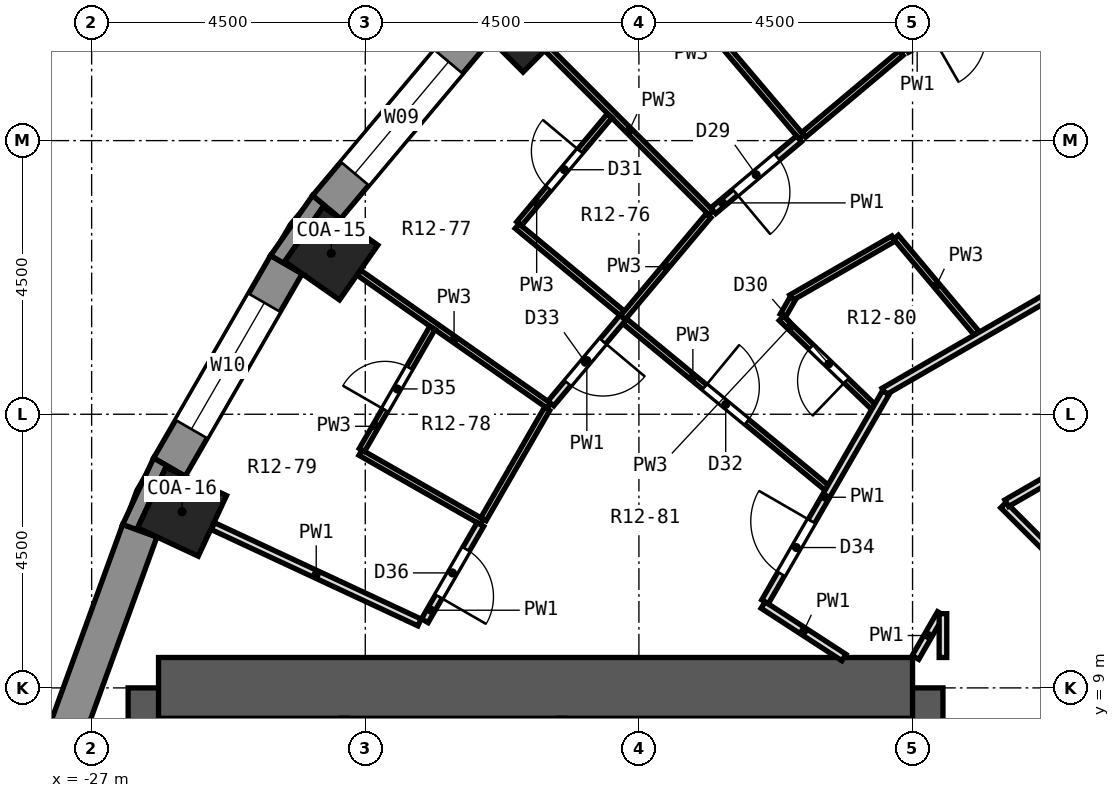
"""IFC4 building model, lengths in metres.
Left out: names, types, materials, properties, quantities, classifications, styles, units other than length and angle.
Written with IfcOpenShell. Run it as: python <this file> out.ifc"""

import sys

from ifc_helpers import new_model, si_unit, direction, frame, frame_2d, origin, origin_2d, place, context, subcontext, project, spatial, polyline, rectangle, outline, extrude, element, fill, save


model = new_model("IFC4")
c1 = context("Model", 3, precision=1e-05, world=origin(), true_north=direction((0.0, 1.0)))
c2 = subcontext(c1, "Body", "Model", "MODEL_VIEW")
j1 = project(units=[si_unit("LENGTHUNIT", "METRE"), si_unit("PLANEANGLEUNIT", "RADIAN")], contexts=[c1])
p1 = place(None, origin())
s1 = spatial("IfcSite", under=j1, at=p1, CompositionType="ELEMENT")
p2 = place(p1, origin())
s2 = spatial("IfcBuilding", under=s1, at=p2, CompositionType="ELEMENT")
p3 = place(p2, frame((0.0, 0.0, 56.0)))
s3 = spatial("IfcBuildingStorey", under=s2, at=p3, CompositionType="ELEMENT", Elevation=56.0)
for number, where, z_axis, x_axis in (
    (1, (-19.905, 19.905, 0.0), (0.0, 0.0, 1.0), (-0.707, 0.707, 0.0)),
    (2, (-23.059, 16.146, 0.0), (0.0, 0.0, 1.0), (-0.819, 0.574, 0.0)),
    (3, (-25.512, 11.897, 0.0), (0.0, 0.0, 1.0), (-0.906, 0.423, 0.0)),
):
    element("IfcColumn", number, at=place(p3, frame(where, z_axis=z_axis, x_axis=x_axis)), inside=s3, PredefinedType="COLUMN", context=c2, shape_type="SweptSolid", body=[
        extrude(rectangle(XDim=1.1, YDim=1.1, at=origin_2d()), origin(), (0.0, 0.0, 1.0), 3.3),
    ])
p4 = place(p3, frame((-13.5, -9.0, 0.0), z_axis=(0.0, 0.0, 1.0), x_axis=(0.0, 1.0, 0.0)))
e4 = element("IfcWall", 4, at=p4, inside=s3, PredefinedType="SHEAR", context=c2, shape_type="SweptSolid", body=[
    extrude(rectangle(XDim=18.0, YDim=1.0, at=frame_2d((9.0, 0.0))), origin(), (0.0, 0.0, 1.0), 3.3),
])
p5 = place(p4, frame((15.4, 0.0, 0.0)))
e5 = element("IfcOpeningElement", 5, at=p5, cuts=e4, PredefinedType="OPENING", context=c2, shape_type="SweptSolid", body=[
    extrude(rectangle(XDim=1.2, YDim=2.1, at=frame_2d((0.6, 1.05))), frame((0.0, 0.512, 0.0), z_axis=(0.0, -1.0, 0.0), x_axis=(1.0, 0.0, 0.0)), (0.0, 0.0, 1.0), 1.024),
])
p6 = place(p4, frame((1.4, 0.0, 0.0)))
e6 = element("IfcOpeningElement", 6, at=p6, cuts=e4, PredefinedType="OPENING", context=c2, shape_type="SweptSolid", body=[
    extrude(rectangle(XDim=1.2, YDim=2.1, at=frame_2d((0.6, 1.05))), frame((0.0, 0.512, 0.0), z_axis=(0.0, -1.0, 0.0), x_axis=(1.0, 0.0, 0.0)), (0.0, 0.0, 1.0), 1.024),
])
p7 = place(p4, frame((7.5, 0.0, 0.0)))
e7 = element("IfcOpeningElement", 7, at=p7, cuts=e4, PredefinedType="OPENING", context=c2, shape_type="SweptSolid", body=[
    extrude(rectangle(XDim=3.0, YDim=2.4, at=frame_2d((1.5, 1.2))), frame((0.0, 0.512, 0.0), z_axis=(0.0, -1.0, 0.0), x_axis=(1.0, 0.0, 0.0)), (0.0, 0.0, 1.0), 1.024),
])
p8 = place(p3, frame((-25.9, -9.0, 0.0), z_axis=(0.0, 0.0, 1.0), x_axis=(0.0, 1.0, 0.0)))
e8 = element("IfcWall", 8, at=p8, inside=s3, PredefinedType="SHEAR", context=c2, shape_type="SweptSolid", body=[
    extrude(rectangle(XDim=18.0, YDim=1.0, at=frame_2d((9.0, 0.0))), origin(), (0.0, 0.0, 1.0), 3.3),
])
p9 = place(p3, frame((-13.5, 9.0, 0.0), z_axis=(0.0, 0.0, 1.0), x_axis=(-1.0, 0.0, 0.0)))
e9 = element("IfcWall", 9, at=p9, inside=s3, PredefinedType="SHEAR", context=c2, shape_type="SweptSolid", body=[
    extrude(rectangle(XDim=12.4, YDim=1.0, at=frame_2d((6.2, 0.0))), origin(), (0.0, 0.0, 1.0), 3.3),
])
p10 = place(p3, frame((-20.665, 19.85, 0.0), z_axis=(0.0, 0.0, 1.0), x_axis=(-0.642809392687, -0.766026164483, 0.0)))
e10 = element("IfcWall", 10, at=p10, inside=s3, PredefinedType="SOLIDWALL", context=c2, shape_type="SweptSolid", body=[
    extrude(rectangle(XDim=3.846, YDim=0.6, at=frame_2d((1.923, 0.0))), origin(), (0.0, 0.0, 1.0), 2.75),
])
p11 = place(p10, frame((0.723, 0.0, 0.9)))
e11 = element("IfcOpeningElement", 11, at=p11, cuts=e10, PredefinedType="OPENING", context=c2, shape_type="SweptSolid", body=[
    extrude(rectangle(XDim=2.4, YDim=1.8, at=frame_2d((1.2, 0.9))), frame((0.0, 0.312, 0.0), z_axis=(0.0, -1.0, 0.0), x_axis=(1.0, 0.0, 0.0)), (0.0, 0.0, 1.0), 0.624),
])
p12 = place(p3, frame((-23.798, 15.96, 0.0), z_axis=(0.0, 0.0, 1.0), x_axis=(-0.499989888488, -0.86603124159, 0.0)))
e12 = element("IfcWall", 12, at=p12, inside=s3, PredefinedType="SOLIDWALL", context=c2, shape_type="SweptSolid", body=[
    extrude(rectangle(XDim=3.846, YDim=0.6, at=frame_2d((1.923, 0.0))), origin(), (0.0, 0.0, 1.0), 2.75),
])
p13 = place(p12, frame((0.723, 0.0, 0.9)))
e13 = element("IfcOpeningElement", 13, at=p13, cuts=e12, PredefinedType="OPENING", context=c2, shape_type="SweptSolid", body=[
    extrude(rectangle(XDim=2.4, YDim=1.8, at=frame_2d((1.2, 0.9))), frame((0.0, 0.312, 0.0), z_axis=(0.0, -1.0, 0.0), x_axis=(1.0, 0.0, 0.0)), (0.0, 0.0, 1.0), 0.624),
])
p14 = place(p3, frame((-26.208, 11.585, 0.0), z_axis=(0.0, 0.0, 1.0), x_axis=(-0.342028474173, -0.939689588564, 0.0)))
e14 = element("IfcWall", 14, at=p14, inside=s3, PredefinedType="SOLIDWALL", context=c2, shape_type="SweptSolid", body=[
    extrude(rectangle(XDim=3.846, YDim=0.6, at=frame_2d((1.923, 0.0))), origin(), (0.0, 0.0, 1.0), 2.75),
])
p15 = place(p3, origin())
e15 = element("IfcWall", 15, at=p15, inside=s3, PredefinedType="SOLIDWALL", context=c2, shape_type="SweptSolid", body=[
    extrude(outline(polyline([(-23.367, 17.097), (-24.058, 16.11), (-23.538, 15.81), (-23.825, 16.011), (-23.194, 16.912), (-22.907, 16.711), (-23.367, 17.097)])), origin(), (0.0, 0.0, 1.0), 2.75),
])
p16 = place(p3, origin())
e16 = element("IfcWall", 16, at=p16, inside=s3, PredefinedType="SOLIDWALL", context=c2, shape_type="SweptSolid", body=[
    extrude(outline(polyline([(-26.49, 11.688), (-25.926, 11.483), (-26.243, 11.631), (-25.779, 12.628), (-25.461, 12.479), (-25.981, 12.78), (-26.49, 11.688)])), origin(), (0.0, 0.0, 1.0), 2.75),
])
p17 = place(p3, frame((-13.772, 16.413, 0.0), z_axis=(0.0, 0.0, 1.0), x_axis=(0.642721705291, -0.766099738643, 0.0)))
e17 = element("IfcWall", 17, at=p17, inside=s3, PredefinedType="PARTITIONING", context=c2, shape_type="SweptSolid", body=[
    extrude(rectangle(XDim=2.07, YDim=0.1, at=frame_2d((1.035, 0.0))), origin(), (0.0, 0.0, 1.0), 2.75),
])
p18 = place(p3, frame((-16.817, 19.816, 0.0), z_axis=(0.0, 0.0, 1.0), x_axis=(0.646883930741, -0.762588473653, 0.0)))
e18 = element("IfcWall", 18, at=p18, inside=s3, PredefinedType="PARTITIONING", context=c2, shape_type="SweptSolid", body=[
    extrude(rectangle(XDim=2.3, YDim=0.1, at=frame_2d((1.15, 0.0))), origin(), (0.0, 0.0, 1.0), 2.75),
])
p19 = place(p3, frame((-19.509, 19.509, 0.0), z_axis=(0.0, 0.0, 1.0), x_axis=(0.707106781187, -0.707106781187, 0.0)))
e19 = element("IfcWall", 19, at=p19, inside=s3, PredefinedType="PARTITIONING", context=c2, shape_type="SweptSolid", body=[
    extrude(rectangle(XDim=3.81, YDim=0.1, at=frame_2d((1.905, 0.0))), origin(), (0.0, 0.0, 1.0), 2.75),
])
p20 = place(p3, frame((-12.006, 12.006, 0.0), z_axis=(0.0, 0.0, 1.0), x_axis=(0.707106781187, -0.707106781187, 0.0)))
e20 = element("IfcWall", 20, at=p20, inside=s3, PredefinedType="PARTITIONING", context=c2, shape_type="SweptSolid", body=[
    extrude(rectangle(XDim=7.387, YDim=0.125, at=frame_2d((3.693, 0.0))), origin(), (0.0, 0.0, 1.0), 2.75),
])
p21 = place(p3, frame((-15.658, 15.078, 0.0), z_axis=(0.0, 0.0, 1.0), x_axis=(0.720406258369, -0.693552321676, 0.0)))
e21 = element("IfcWall", 21, at=p21, inside=s3, PredefinedType="PARTITIONING", context=c2, shape_type="SweptSolid", body=[
    extrude(rectangle(XDim=2.1, YDim=0.1, at=frame_2d((1.05, 0.0))), origin(), (0.0, 0.0, 1.0), 2.75),
])
p22 = place(p21, frame((0.681, 0.0, 0.0)))
e22 = element("IfcOpeningElement", 22, at=p22, cuts=e21, PredefinedType="OPENING", context=c2, shape_type="SweptSolid", body=[
    extrude(rectangle(XDim=0.8, YDim=2.1, at=frame_2d((0.4, 1.05))), frame((0.0, 0.062, 0.0), z_axis=(0.0, -1.0, 0.0), x_axis=(1.0, 0.0, 0.0)), (0.0, 0.0, 1.0), 0.124),
])
p23 = place(p3, frame((-20.003, 16.594, 0.0), z_axis=(0.0, 0.0, 1.0), x_axis=(0.769713734446, -0.638389197125, 0.0)))
e23 = element("IfcWall", 23, at=p23, inside=s3, PredefinedType="PARTITIONING", context=c2, shape_type="SweptSolid", body=[
    extrude(rectangle(XDim=2.25, YDim=0.1, at=frame_2d((1.125, 0.0))), origin(), (0.0, 0.0, 1.0), 2.75),
])
p24 = place(p3, frame((-18.232, 15.029, 0.0), z_axis=(0.0, 0.0, 1.0), x_axis=(0.771607312324, -0.636099171174, 0.0)))
e24 = element("IfcWall", 24, at=p24, inside=s3, PredefinedType="PARTITIONING", context=c2, shape_type="SweptSolid", body=[
    extrude(rectangle(XDim=4.301, YDim=0.1, at=frame_2d((2.15, 0.0))), origin(), (0.0, 0.0, 1.0), 2.75),
])
p25 = place(p24, frame((1.7, 0.0, 0.0)))
e25 = element("IfcOpeningElement", 25, at=p25, cuts=e24, PredefinedType="OPENING", context=c2, shape_type="SweptSolid", body=[
    extrude(rectangle(XDim=0.9, YDim=2.1, at=frame_2d((0.45, 1.05))), frame((0.0, 0.062, 0.0), z_axis=(0.0, -1.0, 0.0), x_axis=(1.0, 0.0, 0.0)), (0.0, 0.0, 1.0), 0.124),
])
p26 = place(p3, frame((-22.601, 15.825, 0.0), z_axis=(0.0, 0.0, 1.0), x_axis=(0.819153632733, -0.573574167811, 0.0)))
e26 = element("IfcWall", 26, at=p26, inside=s3, PredefinedType="PARTITIONING", context=c2, shape_type="SweptSolid", body=[
    extrude(rectangle(XDim=3.81, YDim=0.1, at=frame_2d((1.905, 0.0))), origin(), (0.0, 0.0, 1.0), 2.75),
])
p27 = place(p3, frame((-15.957, 10.362, 0.0), z_axis=(0.0, 0.0, 1.0), x_axis=(0.838795721465, -0.544446267002, 0.0)))
e27 = element("IfcWall", 27, at=p27, inside=s3, PredefinedType="PARTITIONING", context=c2, shape_type="SweptSolid", body=[
    extrude(rectangle(XDim=1.583, YDim=0.125, at=frame_2d((0.792, 0.0))), origin(), (0.0, 0.0, 1.0), 2.75),
])
p28 = place(p3, frame((-22.58, 12.869, 0.0), z_axis=(0.0, 0.0, 1.0), x_axis=(0.868771789729, -0.495212658735, 0.0)))
e28 = element("IfcWall", 28, at=p28, inside=s3, PredefinedType="PARTITIONING", context=c2, shape_type="SweptSolid", body=[
    extrude(rectangle(XDim=2.3, YDim=0.1, at=frame_2d((1.15, 0.0))), origin(), (0.0, 0.0, 1.0), 2.75),
])
p29 = place(p3, frame((-25.005, 11.66, 0.0), z_axis=(0.0, 0.0, 1.0), x_axis=(0.906339528383, -0.42255018553, 0.0)))
e29 = element("IfcWall", 29, at=p29, inside=s3, PredefinedType="PARTITIONING", context=c2, shape_type="SweptSolid", body=[
    extrude(rectangle(XDim=3.748, YDim=0.125, at=frame_2d((1.874, 0.0))), origin(), (0.0, 0.0, 1.0), 2.75),
])
p30 = place(p3, frame((-11.952, 12.037, 0.0), z_axis=(0.0, 0.0, 1.0), x_axis=(0.866072505035, 0.499918409365, 0.0)))
e30 = element("IfcWall", 30, at=p30, inside=s3, PredefinedType="PARTITIONING", context=c2, shape_type="SweptSolid", body=[
    extrude(rectangle(XDim=8.664, YDim=0.125, at=frame_2d((4.332, 0.0))), origin(), (0.0, 0.0, 1.0), 2.75),
])
p31 = place(p30, frame((3.882, 0.0, 0.0)))
e31 = element("IfcOpeningElement", 31, at=p31, cuts=e30, PredefinedType="OPENING", context=c2, shape_type="SweptSolid", body=[
    extrude(rectangle(XDim=0.9, YDim=2.1, at=frame_2d((0.45, 1.05))), frame((0.0, 0.074, 0.0), z_axis=(0.0, -1.0, 0.0), x_axis=(1.0, 0.0, 0.0)), (0.0, 0.0, 1.0), 0.149),
])
p32 = place(p3, frame((-13.971, 13.873, 0.0), z_axis=(0.0, 0.0, 1.0), x_axis=(0.866024825845, 0.50000100102, 0.0)))
e32 = element("IfcWall", 32, at=p32, inside=s3, PredefinedType="PARTITIONING", context=c2, shape_type="SweptSolid", body=[
    extrude(rectangle(XDim=10.192, YDim=0.125, at=frame_2d((5.096, 0.0))), origin(), (0.0, 0.0, 1.0), 2.75),
])
p33 = place(p3, frame((-15.496, 15.417, 0.0), z_axis=(0.0, 0.0, 1.0), x_axis=(0.865919547832, 0.500183303083, 0.0)))
e33 = element("IfcWall", 33, at=p33, inside=s3, PredefinedType="PARTITIONING", context=c2, shape_type="SweptSolid", body=[
    extrude(rectangle(XDim=1.941, YDim=0.1, at=frame_2d((0.971, 0.0))), origin(), (0.0, 0.0, 1.0), 2.75),
])
p34 = place(p3, frame((-15.291, 18.094, 0.0), z_axis=(0.0, 0.0, 1.0), x_axis=(0.765911671875, 0.642945807114, 0.0)))
e34 = element("IfcWall", 34, at=p34, inside=s3, PredefinedType="PARTITIONING", context=c2, shape_type="SweptSolid", body=[
    extrude(rectangle(XDim=2.093, YDim=0.1, at=frame_2d((1.046, 0.0))), origin(), (0.0, 0.0, 1.0), 2.75),
])
p35 = place(p3, frame((-16.777, 16.847, 0.0), z_axis=(0.0, 0.0, 1.0), x_axis=(0.766052425686, 0.642778096314, 0.0)))
e35 = element("IfcWall", 35, at=p35, inside=s3, PredefinedType="PARTITIONING", context=c2, shape_type="SweptSolid", body=[
    extrude(rectangle(XDim=1.84, YDim=0.125, at=frame_2d((0.92, 0.0))), origin(), (0.0, 0.0, 1.0), 2.75),
])
p36 = place(p35, frame((0.47, 0.0, 0.0)))
e36 = element("IfcOpeningElement", 36, at=p36, cuts=e35, PredefinedType="OPENING", context=c2, shape_type="SweptSolid", body=[
    extrude(rectangle(XDim=0.9, YDim=2.1, at=frame_2d((0.45, 1.05))), frame((0.0, 0.074, 0.0), z_axis=(0.0, -1.0, 0.0), x_axis=(1.0, 0.0, 0.0)), (0.0, 0.0, 1.0), 0.149),
])
p37 = place(p3, frame((-18.265, 15.087, 0.0), z_axis=(0.0, 0.0, 1.0), x_axis=(0.643038029584, 0.765834246106, 0.0)))
e37 = element("IfcWall", 37, at=p37, inside=s3, PredefinedType="PARTITIONING", context=c2, shape_type="SweptSolid", body=[
    extrude(rectangle(XDim=2.193, YDim=0.1, at=frame_2d((1.096, 0.0))), origin(), (0.0, 0.0, 1.0), 2.75),
])
p38 = place(p3, frame((-19.448, 13.678, 0.0), z_axis=(0.0, 0.0, 1.0), x_axis=(0.642778096314, 0.766052425686, 0.0)))
e38 = element("IfcWall", 38, at=p38, inside=s3, PredefinedType="PARTITIONING", context=c2, shape_type="SweptSolid", body=[
    extrude(rectangle(XDim=1.84, YDim=0.125, at=frame_2d((0.92, 0.0))), origin(), (0.0, 0.0, 1.0), 2.75),
])
p39 = place(p38, frame((0.433, 0.0, 0.0)))
e39 = element("IfcOpeningElement", 39, at=p39, cuts=e38, PredefinedType="OPENING", context=c2, shape_type="SweptSolid", body=[
    extrude(rectangle(XDim=0.9, YDim=2.1, at=frame_2d((0.45, 1.05))), frame((0.0, 0.074, 0.0), z_axis=(0.0, -1.0, 0.0), x_axis=(1.0, 0.0, 0.0)), (0.0, 0.0, 1.0), 0.149),
])
p40 = place(p3, frame((-19.971, 16.632, 0.0), z_axis=(0.0, 0.0, 1.0), x_axis=(0.642624220064, 0.766181513603, 0.0)))
e40 = element("IfcWall", 40, at=p40, inside=s3, PredefinedType="PARTITIONING", context=c2, shape_type="SweptSolid", body=[
    extrude(rectangle(XDim=2.32, YDim=0.1, at=frame_2d((1.16, 0.0))), origin(), (0.0, 0.0, 1.0), 2.75),
])
p41 = place(p40, frame((0.76, 0.0, 0.0)))
e41 = element("IfcOpeningElement", 41, at=p41, cuts=e40, PredefinedType="OPENING", context=c2, shape_type="SweptSolid", body=[
    extrude(rectangle(XDim=0.8, YDim=2.1, at=frame_2d((0.4, 1.05))), frame((0.0, 0.062, 0.0), z_axis=(0.0, -1.0, 0.0), x_axis=(1.0, 0.0, 0.0)), (0.0, 0.0, 1.0), 0.124),
])
p42 = place(p3, frame((-13.452, 9.5, 0.0), z_axis=(0.0, 0.0, 1.0), x_axis=(0.49991670217, 0.866073490468, 0.0)))
e42 = element("IfcWall", 42, at=p42, inside=s3, PredefinedType="PARTITIONING", context=c2, shape_type="SweptSolid", body=[
    extrude(rectangle(XDim=0.834, YDim=0.125, at=frame_2d((0.417, 0.0))), origin(), (0.0, 0.0, 1.0), 2.75),
])
p43 = place(p3, frame((-15.926, 10.416, 0.0), z_axis=(0.0, 0.0, 1.0), x_axis=(0.500020477838, 0.866013580576, 0.0)))
e43 = element("IfcWall", 43, at=p43, inside=s3, PredefinedType="PARTITIONING", context=c2, shape_type="SweptSolid", body=[
    extrude(rectangle(XDim=3.971, YDim=0.125, at=frame_2d((1.985, 0.0))), origin(), (0.0, 0.0, 1.0), 2.75),
])
p44 = place(p43, frame((0.53, 0.0, 0.0)))
e44 = element("IfcOpeningElement", 44, at=p44, cuts=e43, PredefinedType="OPENING", context=c2, shape_type="SweptSolid", body=[
    extrude(rectangle(XDim=1.0, YDim=2.1, at=frame_2d((0.5, 1.05))), frame((0.0, 0.074, 0.0), z_axis=(0.0, -1.0, 0.0), x_axis=(1.0, 0.0, 0.0)), (0.0, 0.0, 1.0), 0.149),
])
p45 = place(p3, frame((-20.557, 11.773, 0.0), z_axis=(0.0, 0.0, 1.0), x_axis=(0.499752749986, 0.866168106594, 0.0)))
e45 = element("IfcWall", 45, at=p45, inside=s3, PredefinedType="PARTITIONING", context=c2, shape_type="SweptSolid", body=[
    extrude(rectangle(XDim=2.093, YDim=0.1, at=frame_2d((1.046, 0.0))), origin(), (0.0, 0.0, 1.0), 2.75),
])
p46 = place(p3, frame((-21.521, 10.104, 0.0), z_axis=(0.0, 0.0, 1.0), x_axis=(0.500003827654, 0.866023193876, 0.0)))
e46 = element("IfcWall", 46, at=p46, inside=s3, PredefinedType="PARTITIONING", context=c2, shape_type="SweptSolid", body=[
    extrude(rectangle(XDim=1.828, YDim=0.125, at=frame_2d((0.914, 0.0))), origin(), (0.0, 0.0, 1.0), 2.75),
])
p47 = place(p46, frame((0.458, 0.0, 0.0)))
e47 = element("IfcOpeningElement", 47, at=p47, cuts=e46, PredefinedType="OPENING", context=c2, shape_type="SweptSolid", body=[
    extrude(rectangle(XDim=0.9, YDim=2.1, at=frame_2d((0.45, 1.05))), frame((0.0, 0.074, 0.0), z_axis=(0.0, -1.0, 0.0), x_axis=(1.0, 0.0, 0.0)), (0.0, 0.0, 1.0), 0.149),
])
p48 = place(p3, frame((-22.555, 12.912, 0.0), z_axis=(0.0, 0.0, 1.0), x_axis=(0.499819678633, 0.866129487347, 0.0)))
e48 = element("IfcWall", 48, at=p48, inside=s3, PredefinedType="PARTITIONING", context=c2, shape_type="SweptSolid", body=[
    extrude(rectangle(XDim=2.319, YDim=0.1, at=frame_2d((1.159, 0.0))), origin(), (0.0, 0.0, 1.0), 2.75),
])
p49 = place(p48, frame((0.76, 0.0, 0.0)))
e49 = element("IfcOpeningElement", 49, at=p49, cuts=e48, PredefinedType="OPENING", context=c2, shape_type="SweptSolid", body=[
    extrude(rectangle(XDim=0.8, YDim=2.1, at=frame_2d((0.4, 1.05))), frame((0.0, 0.062, 0.0), z_axis=(0.0, -1.0, 0.0), x_axis=(1.0, 0.0, 0.0)), (0.0, 0.0, 1.0), 0.124),
])
p50 = place(p3, frame((-15.633, 15.121, 0.0), z_axis=(0.0, 0.0, 1.0), x_axis=(0.499375175205, 0.866385846139, 0.0)))
e50 = element("IfcWall", 50, at=p50, inside=s3, PredefinedType="PARTITIONING", context=c2, shape_type="SweptSolid", body=[
    extrude(rectangle(XDim=0.325, YDim=0.1, at=frame_2d((0.162, 0.0))), origin(), (0.0, 0.0, 1.0), 2.75),
])
p51 = place(p3, frame((-13.0, 9.5, 0.0), z_axis=(0.0, 0.0, 1.0), x_axis=(0.0, 1.0, 0.0)))
e51 = element("IfcWall", 51, at=p51, inside=s3, PredefinedType="PARTITIONING", context=c2, shape_type="SweptSolid", body=[
    extrude(rectangle(XDim=0.72, YDim=0.125, at=frame_2d((0.36, 0.0))), origin(), (0.0, 0.0, 1.0), 2.75),
])
for number, where, z_axis, x_axis in (
    (52, (-19.27, 5.3, 0.0), (0.0, 0.0, 1.0), (0.0, 1.0, 0.0)),
    (53, (-22.846, 5.3, 0.0), (0.0, 0.0, 1.0), (0.0, 1.0, 0.0)),
):
    element("IfcWall", number, at=place(p3, frame(where, z_axis=z_axis, x_axis=x_axis)), inside=s3, PredefinedType="PARTITIONING", context=c2, shape_type="SweptSolid", body=[
        extrude(rectangle(XDim=3.2, YDim=0.1, at=frame_2d((1.6, 0.0))), origin(), (0.0, 0.0, 1.0), 2.75),
    ])
p52 = place(p11, origin())
e54 = element("IfcWindow", 54, at=p52, inside=s3, PartitioningType="SINGLE_PANEL", PredefinedType="WINDOW", context=c2, shape_type="SweptSolid", body=[
    extrude(rectangle(XDim=2.4, YDim=1.8, at=frame_2d((1.2, 0.9))), frame((0.0, 0.18, 0.0), z_axis=(0.0, -1.0, 0.0), x_axis=(1.0, 0.0, 0.0)), (0.0, 0.0, 1.0), 0.06),
])
fill(e11, e54)
p53 = place(p13, origin())
e55 = element("IfcWindow", 55, at=p53, inside=s3, PartitioningType="SINGLE_PANEL", PredefinedType="WINDOW", context=c2, shape_type="SweptSolid", body=[
    extrude(rectangle(XDim=2.4, YDim=1.8, at=frame_2d((1.2, 0.9))), frame((0.0, 0.18, 0.0), z_axis=(0.0, -1.0, 0.0), x_axis=(1.0, 0.0, 0.0)), (0.0, 0.0, 1.0), 0.06),
])
fill(e13, e55)
p54 = place(p36, frame((0.9, 0.0, 0.0), z_axis=(0.0, 0.0, 1.0), x_axis=(-1.0, 0.0, 0.0)))
e56 = element("IfcDoor", 56, at=p54, inside=s3, OperationType="SINGLE_SWING_RIGHT", PredefinedType="DOOR", context=c2, shape_type="SweptSolid", body=[
    extrude(rectangle(XDim=0.9, YDim=2.1, at=frame_2d((0.45, 1.05))), frame((0.0, 0.025, 0.0), z_axis=(0.0, -1.0, 0.0), x_axis=(1.0, 0.0, 0.0)), (0.0, 0.0, 1.0), 0.05),
])
fill(e36, e56)
p55 = place(p22, frame((0.8, 0.0, 0.0), z_axis=(0.0, 0.0, 1.0), x_axis=(-1.0, 0.0, 0.0)))
e57 = element("IfcDoor", 57, at=p55, inside=s3, OperationType="SINGLE_SWING_LEFT", PredefinedType="DOOR", context=c2, shape_type="SweptSolid", body=[
    extrude(rectangle(XDim=0.8, YDim=2.1, at=frame_2d((0.4, 1.05))), frame((0.0, 0.025, 0.0), z_axis=(0.0, -1.0, 0.0), x_axis=(1.0, 0.0, 0.0)), (0.0, 0.0, 1.0), 0.05),
])
fill(e22, e57)
p56 = place(p41, origin())
e58 = element("IfcDoor", 58, at=p56, inside=s3, OperationType="SINGLE_SWING_RIGHT", PredefinedType="DOOR", context=c2, shape_type="SweptSolid", body=[
    extrude(rectangle(XDim=0.8, YDim=2.1, at=frame_2d((0.4, 1.05))), frame((0.0, 0.025, 0.0), z_axis=(0.0, -1.0, 0.0), x_axis=(1.0, 0.0, 0.0)), (0.0, 0.0, 1.0), 0.05),
])
fill(e41, e58)
p57 = place(p25, origin())
e59 = element("IfcDoor", 59, at=p57, inside=s3, OperationType="SINGLE_SWING_LEFT", PredefinedType="DOOR", context=c2, shape_type="SweptSolid", body=[
    extrude(rectangle(XDim=0.9, YDim=2.1, at=frame_2d((0.45, 1.05))), frame((0.0, 0.025, 0.0), z_axis=(0.0, -1.0, 0.0), x_axis=(1.0, 0.0, 0.0)), (0.0, 0.0, 1.0), 0.05),
])
fill(e25, e59)
p58 = place(p39, frame((0.9, 0.0, 0.0), z_axis=(0.0, 0.0, 1.0), x_axis=(-1.0, 0.0, 0.0)))
e60 = element("IfcDoor", 60, at=p58, inside=s3, OperationType="SINGLE_SWING_LEFT", PredefinedType="DOOR", context=c2, shape_type="SweptSolid", body=[
    extrude(rectangle(XDim=0.9, YDim=2.1, at=frame_2d((0.45, 1.05))), frame((0.0, 0.025, 0.0), z_axis=(0.0, -1.0, 0.0), x_axis=(1.0, 0.0, 0.0)), (0.0, 0.0, 1.0), 0.05),
])
fill(e39, e60)
p59 = place(p44, origin())
e61 = element("IfcDoor", 61, at=p59, inside=s3, OperationType="SINGLE_SWING_RIGHT", PredefinedType="DOOR", context=c2, shape_type="SweptSolid", body=[
    extrude(rectangle(XDim=1.0, YDim=2.1, at=frame_2d((0.5, 1.05))), frame((0.0, 0.025, 0.0), z_axis=(0.0, -1.0, 0.0), x_axis=(1.0, 0.0, 0.0)), (0.0, 0.0, 1.0), 0.05),
])
fill(e44, e61)
p60 = place(p49, origin())
e62 = element("IfcDoor", 62, at=p60, inside=s3, OperationType="SINGLE_SWING_LEFT", PredefinedType="DOOR", context=c2, shape_type="SweptSolid", body=[
    extrude(rectangle(XDim=0.8, YDim=2.1, at=frame_2d((0.4, 1.05))), frame((0.0, 0.025, 0.0), z_axis=(0.0, -1.0, 0.0), x_axis=(1.0, 0.0, 0.0)), (0.0, 0.0, 1.0), 0.05),
])
fill(e49, e62)
p61 = place(p47, frame((0.9, 0.0, 0.0), z_axis=(0.0, 0.0, 1.0), x_axis=(-1.0, 0.0, 0.0)))
e63 = element("IfcDoor", 63, at=p61, inside=s3, OperationType="SINGLE_SWING_RIGHT", PredefinedType="DOOR", context=c2, shape_type="SweptSolid", body=[
    extrude(rectangle(XDim=0.9, YDim=2.1, at=frame_2d((0.45, 1.05))), frame((0.0, 0.025, 0.0), z_axis=(0.0, -1.0, 0.0), x_axis=(1.0, 0.0, 0.0)), (0.0, 0.0, 1.0), 0.05),
])
fill(e47, e63)
save(model, sys.argv[1])
